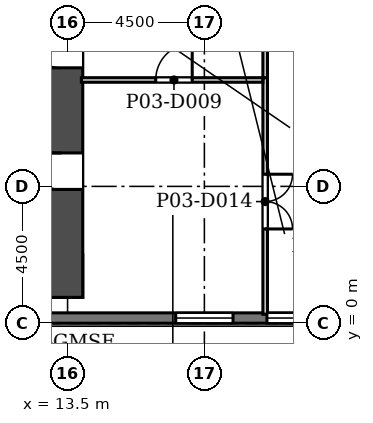
"""IFC4 building model, lengths in metres.
Left out: names, types, materials, properties, quantities, classifications, styles, units other than length and angle.
Written with IfcOpenShell. Run it as: python <this file> out.ifc"""

import sys

from ifc_helpers import new_model, si_unit, direction, frame, frame_2d, origin, place, context, subcontext, project, spatial, rectangle, extrude, element, fill, save


model = new_model("IFC4")
c1 = context("Model", 3, precision=1e-05, world=origin(), true_north=direction((0.0, 1.0)))
c2 = subcontext(c1, "Body", "Model", "MODEL_VIEW")
j1 = project(units=[si_unit("LENGTHUNIT", "METRE"), si_unit("PLANEANGLEUNIT", "RADIAN")], contexts=[c1])
p1 = place(None, origin())
s1 = spatial("IfcSite", under=j1, at=p1, CompositionType="ELEMENT")
p2 = place(p1, origin())
s2 = spatial("IfcBuilding", under=s1, at=p2, CompositionType="ELEMENT")
p3 = place(p2, frame((0.0, 0.0, 20.0)))
s3 = spatial("IfcBuildingStorey", under=s2, at=p3, CompositionType="ELEMENT", Elevation=20.0)
p4 = place(p3, frame((-14.0, 1.55, 0.0), z_axis=(0.0, 0.0, 1.0), x_axis=(1.0, 0.0, 0.0)))
e1 = element("IfcWall", 1, at=p4, inside=s3, PredefinedType="SHEAR", context=c2, shape_type="SweptSolid", body=[
    extrude(rectangle(XDim=28.0, YDim=1.4, at=frame_2d((14.0, 0.0))), origin(), (0.0, 0.0, 1.0), 5.0),
])
p5 = place(p3, frame((13.3, 0.85, 0.0), z_axis=(0.0, 0.0, 1.0), x_axis=(0.0, 1.0, 0.0)))
e2 = element("IfcWall", 2, at=p5, inside=s3, PredefinedType="SHEAR", context=c2, shape_type="SweptSolid", body=[
    extrude(rectangle(XDim=10.202, YDim=1.4, at=frame_2d((5.101, 0.0))), origin(), (0.0, 0.0, 1.0), 5.0),
])
p6 = place(p5, frame((3.55, 0.0, 0.0)))
e3 = element("IfcOpeningElement", 3, at=p6, cuts=e2, PredefinedType="OPENING", context=c2, shape_type="SweptSolid", body=[
    extrude(rectangle(XDim=1.2, YDim=2.1, at=frame_2d((0.6, 1.05))), frame((0.0, 0.71, 0.0), z_axis=(0.0, -1.0, 0.0), x_axis=(1.0, 0.0, 0.0)), (0.0, 0.0, 1.0), 1.42),
])
p7 = place(p5, frame((7.55, 0.0, 0.0)))
e4 = element("IfcOpeningElement", 4, at=p7, cuts=e2, PredefinedType="OPENING", context=c2, shape_type="SweptSolid", body=[
    extrude(rectangle(XDim=1.2, YDim=2.1, at=frame_2d((0.6, 1.05))), frame((0.0, 0.71, 0.0), z_axis=(0.0, -1.0, 0.0), x_axis=(1.0, 0.0, 0.0)), (0.0, 0.0, 1.0), 1.42),
])
p8 = place(p3, frame((-38.0, 0.17, 0.0), z_axis=(0.0, 0.0, 1.0), x_axis=(1.0, 0.0, 0.0)))
e5 = element("IfcWall", 5, at=p8, inside=s3, PredefinedType="SOLIDWALL", context=c2, shape_type="SweptSolid", body=[
    extrude(rectangle(XDim=76.0, YDim=0.34, at=frame_2d((38.0, 0.0))), origin(), (0.0, 0.0, 1.0), 3.0),
])
p9 = place(p8, frame((1.058, 0.0, 0.9)))
e6 = element("IfcOpeningElement", 6, at=p9, cuts=e5, PredefinedType="OPENING", context=c2, shape_type="SweptSolid", body=[
    extrude(rectangle(XDim=1.885, YDim=1.9, at=frame_2d((0.942, 0.95))), frame((0.0, 0.18, 0.0), z_axis=(0.0, -1.0, 0.0), x_axis=(1.0, 0.0, 0.0)), (0.0, 0.0, 1.0), 0.36),
])
p10 = place(p8, frame((4.058, 0.0, 0.9)))
e7 = element("IfcOpeningElement", 7, at=p10, cuts=e5, PredefinedType="OPENING", context=c2, shape_type="SweptSolid", body=[
    extrude(rectangle(XDim=1.885, YDim=1.9, at=frame_2d((0.942, 0.95))), frame((0.0, 0.18, 0.0), z_axis=(0.0, -1.0, 0.0), x_axis=(1.0, 0.0, 0.0)), (0.0, 0.0, 1.0), 0.36),
])
p11 = place(p8, frame((7.058, 0.0, 0.9)))
e8 = element("IfcOpeningElement", 8, at=p11, cuts=e5, PredefinedType="OPENING", context=c2, shape_type="SweptSolid", body=[
    extrude(rectangle(XDim=1.885, YDim=1.9, at=frame_2d((0.942, 0.95))), frame((0.0, 0.18, 0.0), z_axis=(0.0, -1.0, 0.0), x_axis=(1.0, 0.0, 0.0)), (0.0, 0.0, 1.0), 0.36),
])
p12 = place(p8, frame((10.058, 0.0, 0.9)))
e9 = element("IfcOpeningElement", 9, at=p12, cuts=e5, PredefinedType="OPENING", context=c2, shape_type="SweptSolid", body=[
    extrude(rectangle(XDim=1.885, YDim=1.9, at=frame_2d((0.942, 0.95))), frame((0.0, 0.18, 0.0), z_axis=(0.0, -1.0, 0.0), x_axis=(1.0, 0.0, 0.0)), (0.0, 0.0, 1.0), 0.36),
])
p13 = place(p8, frame((13.058, 0.0, 0.9)))
e10 = element("IfcOpeningElement", 10, at=p13, cuts=e5, PredefinedType="OPENING", context=c2, shape_type="SweptSolid", body=[
    extrude(rectangle(XDim=1.885, YDim=1.9, at=frame_2d((0.942, 0.95))), frame((0.0, 0.18, 0.0), z_axis=(0.0, -1.0, 0.0), x_axis=(1.0, 0.0, 0.0)), (0.0, 0.0, 1.0), 0.36),
])
p14 = place(p8, frame((16.058, 0.0, 0.9)))
e11 = element("IfcOpeningElement", 11, at=p14, cuts=e5, PredefinedType="OPENING", context=c2, shape_type="SweptSolid", body=[
    extrude(rectangle(XDim=1.885, YDim=1.9, at=frame_2d((0.942, 0.95))), frame((0.0, 0.18, 0.0), z_axis=(0.0, -1.0, 0.0), x_axis=(1.0, 0.0, 0.0)), (0.0, 0.0, 1.0), 0.36),
])
p15 = place(p8, frame((19.058, 0.0, 0.9)))
e12 = element("IfcOpeningElement", 12, at=p15, cuts=e5, PredefinedType="OPENING", context=c2, shape_type="SweptSolid", body=[
    extrude(rectangle(XDim=1.885, YDim=1.9, at=frame_2d((0.942, 0.95))), frame((0.0, 0.18, 0.0), z_axis=(0.0, -1.0, 0.0), x_axis=(1.0, 0.0, 0.0)), (0.0, 0.0, 1.0), 0.36),
])
p16 = place(p8, frame((55.058, 0.0, 0.9)))
e13 = element("IfcOpeningElement", 13, at=p16, cuts=e5, PredefinedType="OPENING", context=c2, shape_type="SweptSolid", body=[
    extrude(rectangle(XDim=1.885, YDim=1.9, at=frame_2d((0.942, 0.95))), frame((0.0, 0.18, 0.0), z_axis=(0.0, -1.0, 0.0), x_axis=(1.0, 0.0, 0.0)), (0.0, 0.0, 1.0), 0.36),
])
p17 = place(p8, frame((58.058, 0.0, 0.9)))
e14 = element("IfcOpeningElement", 14, at=p17, cuts=e5, PredefinedType="OPENING", context=c2, shape_type="SweptSolid", body=[
    extrude(rectangle(XDim=1.885, YDim=1.9, at=frame_2d((0.942, 0.95))), frame((0.0, 0.18, 0.0), z_axis=(0.0, -1.0, 0.0), x_axis=(1.0, 0.0, 0.0)), (0.0, 0.0, 1.0), 0.36),
])
p18 = place(p8, frame((61.058, 0.0, 0.9)))
e15 = element("IfcOpeningElement", 15, at=p18, cuts=e5, PredefinedType="OPENING", context=c2, shape_type="SweptSolid", body=[
    extrude(rectangle(XDim=1.885, YDim=1.9, at=frame_2d((0.942, 0.95))), frame((0.0, 0.18, 0.0), z_axis=(0.0, -1.0, 0.0), x_axis=(1.0, 0.0, 0.0)), (0.0, 0.0, 1.0), 0.36),
])
p19 = place(p8, frame((64.058, 0.0, 0.9)))
e16 = element("IfcOpeningElement", 16, at=p19, cuts=e5, PredefinedType="OPENING", context=c2, shape_type="SweptSolid", body=[
    extrude(rectangle(XDim=1.885, YDim=1.9, at=frame_2d((0.942, 0.95))), frame((0.0, 0.18, 0.0), z_axis=(0.0, -1.0, 0.0), x_axis=(1.0, 0.0, 0.0)), (0.0, 0.0, 1.0), 0.36),
])
p20 = place(p8, frame((67.058, 0.0, 0.9)))
e17 = element("IfcOpeningElement", 17, at=p20, cuts=e5, PredefinedType="OPENING", context=c2, shape_type="SweptSolid", body=[
    extrude(rectangle(XDim=1.885, YDim=1.9, at=frame_2d((0.942, 0.95))), frame((0.0, 0.18, 0.0), z_axis=(0.0, -1.0, 0.0), x_axis=(1.0, 0.0, 0.0)), (0.0, 0.0, 1.0), 0.36),
])
p21 = place(p8, frame((70.058, 0.0, 0.9)))
e18 = element("IfcOpeningElement", 18, at=p21, cuts=e5, PredefinedType="OPENING", context=c2, shape_type="SweptSolid", body=[
    extrude(rectangle(XDim=1.885, YDim=1.9, at=frame_2d((0.942, 0.95))), frame((0.0, 0.18, 0.0), z_axis=(0.0, -1.0, 0.0), x_axis=(1.0, 0.0, 0.0)), (0.0, 0.0, 1.0), 0.36),
])
p22 = place(p8, frame((73.058, 0.0, 0.9)))
e19 = element("IfcOpeningElement", 19, at=p22, cuts=e5, PredefinedType="OPENING", context=c2, shape_type="SweptSolid", body=[
    extrude(rectangle(XDim=1.885, YDim=1.9, at=frame_2d((0.942, 0.95))), frame((0.0, 0.18, 0.0), z_axis=(0.0, -1.0, 0.0), x_axis=(1.0, 0.0, 0.0)), (0.0, 0.0, 1.0), 0.36),
])
p23 = place(p3, frame((42.853, 8.575, 0.0), z_axis=(0.0, 0.0, 1.0), x_axis=(-0.49999894854, 0.866026010844, 0.0)))
e20 = element("IfcWall", 20, at=p23, inside=s3, PredefinedType="SOLIDWALL", context=c2, shape_type="SweptSolid", body=[
    extrude(rectangle(XDim=76.0, YDim=0.34, at=frame_2d((38.0, 0.0))), origin(), (0.0, 0.0, 1.0), 3.0),
])
p24 = place(p23, frame((1.058, 0.0, 0.9)))
e21 = element("IfcOpeningElement", 21, at=p24, cuts=e20, PredefinedType="OPENING", context=c2, shape_type="SweptSolid", body=[
    extrude(rectangle(XDim=1.885, YDim=1.9, at=frame_2d((0.942, 0.95))), frame((0.0, 0.18, 0.0), z_axis=(0.0, -1.0, 0.0), x_axis=(1.0, 0.0, 0.0)), (0.0, 0.0, 1.0), 0.36),
])
p25 = place(p23, frame((4.058, 0.0, 0.9)))
e22 = element("IfcOpeningElement", 22, at=p25, cuts=e20, PredefinedType="OPENING", context=c2, shape_type="SweptSolid", body=[
    extrude(rectangle(XDim=1.885, YDim=1.9, at=frame_2d((0.942, 0.95))), frame((0.0, 0.18, 0.0), z_axis=(0.0, -1.0, 0.0), x_axis=(1.0, 0.0, 0.0)), (0.0, 0.0, 1.0), 0.36),
])
p26 = place(p23, frame((7.058, 0.0, 0.9)))
e23 = element("IfcOpeningElement", 23, at=p26, cuts=e20, PredefinedType="OPENING", context=c2, shape_type="SweptSolid", body=[
    extrude(rectangle(XDim=1.885, YDim=1.9, at=frame_2d((0.942, 0.95))), frame((0.0, 0.18, 0.0), z_axis=(0.0, -1.0, 0.0), x_axis=(1.0, 0.0, 0.0)), (0.0, 0.0, 1.0), 0.36),
])
p27 = place(p23, frame((10.058, 0.0, 0.9)))
e24 = element("IfcOpeningElement", 24, at=p27, cuts=e20, PredefinedType="OPENING", context=c2, shape_type="SweptSolid", body=[
    extrude(rectangle(XDim=1.885, YDim=1.9, at=frame_2d((0.942, 0.95))), frame((0.0, 0.18, 0.0), z_axis=(0.0, -1.0, 0.0), x_axis=(1.0, 0.0, 0.0)), (0.0, 0.0, 1.0), 0.36),
])
p28 = place(p23, frame((13.058, 0.0, 0.9)))
e25 = element("IfcOpeningElement", 25, at=p28, cuts=e20, PredefinedType="OPENING", context=c2, shape_type="SweptSolid", body=[
    extrude(rectangle(XDim=1.885, YDim=1.9, at=frame_2d((0.942, 0.95))), frame((0.0, 0.18, 0.0), z_axis=(0.0, -1.0, 0.0), x_axis=(1.0, 0.0, 0.0)), (0.0, 0.0, 1.0), 0.36),
])
p29 = place(p23, frame((16.058, 0.0, 0.9)))
e26 = element("IfcOpeningElement", 26, at=p29, cuts=e20, PredefinedType="OPENING", context=c2, shape_type="SweptSolid", body=[
    extrude(rectangle(XDim=1.885, YDim=1.9, at=frame_2d((0.942, 0.95))), frame((0.0, 0.18, 0.0), z_axis=(0.0, -1.0, 0.0), x_axis=(1.0, 0.0, 0.0)), (0.0, 0.0, 1.0), 0.36),
])
p30 = place(p23, frame((19.058, 0.0, 0.9)))
e27 = element("IfcOpeningElement", 27, at=p30, cuts=e20, PredefinedType="OPENING", context=c2, shape_type="SweptSolid", body=[
    extrude(rectangle(XDim=1.885, YDim=1.9, at=frame_2d((0.942, 0.95))), frame((0.0, 0.18, 0.0), z_axis=(0.0, -1.0, 0.0), x_axis=(1.0, 0.0, 0.0)), (0.0, 0.0, 1.0), 0.36),
])
p31 = place(p23, frame((22.058, 0.0, 0.9)))
e28 = element("IfcOpeningElement", 28, at=p31, cuts=e20, PredefinedType="OPENING", context=c2, shape_type="SweptSolid", body=[
    extrude(rectangle(XDim=1.885, YDim=1.9, at=frame_2d((0.942, 0.95))), frame((0.0, 0.18, 0.0), z_axis=(0.0, -1.0, 0.0), x_axis=(1.0, 0.0, 0.0)), (0.0, 0.0, 1.0), 0.36),
])
p32 = place(p23, frame((25.058, 0.0, 0.9)))
e29 = element("IfcOpeningElement", 29, at=p32, cuts=e20, PredefinedType="OPENING", context=c2, shape_type="SweptSolid", body=[
    extrude(rectangle(XDim=1.885, YDim=1.9, at=frame_2d((0.942, 0.95))), frame((0.0, 0.18, 0.0), z_axis=(0.0, -1.0, 0.0), x_axis=(1.0, 0.0, 0.0)), (0.0, 0.0, 1.0), 0.36),
])
p33 = place(p23, frame((28.058, 0.0, 0.9)))
e30 = element("IfcOpeningElement", 30, at=p33, cuts=e20, PredefinedType="OPENING", context=c2, shape_type="SweptSolid", body=[
    extrude(rectangle(XDim=1.885, YDim=1.9, at=frame_2d((0.942, 0.95))), frame((0.0, 0.18, 0.0), z_axis=(0.0, -1.0, 0.0), x_axis=(1.0, 0.0, 0.0)), (0.0, 0.0, 1.0), 0.36),
])
p34 = place(p23, frame((31.058, 0.0, 0.9)))
e31 = element("IfcOpeningElement", 31, at=p34, cuts=e20, PredefinedType="OPENING", context=c2, shape_type="SweptSolid", body=[
    extrude(rectangle(XDim=1.885, YDim=1.9, at=frame_2d((0.942, 0.95))), frame((0.0, 0.18, 0.0), z_axis=(0.0, -1.0, 0.0), x_axis=(1.0, 0.0, 0.0)), (0.0, 0.0, 1.0), 0.36),
])
p35 = place(p23, frame((34.058, 0.0, 0.9)))
e32 = element("IfcOpeningElement", 32, at=p35, cuts=e20, PredefinedType="OPENING", context=c2, shape_type="SweptSolid", body=[
    extrude(rectangle(XDim=1.885, YDim=1.9, at=frame_2d((0.942, 0.95))), frame((0.0, 0.18, 0.0), z_axis=(0.0, -1.0, 0.0), x_axis=(1.0, 0.0, 0.0)), (0.0, 0.0, 1.0), 0.36),
])
p36 = place(p23, frame((37.058, 0.0, 0.9)))
e33 = element("IfcOpeningElement", 33, at=p36, cuts=e20, PredefinedType="OPENING", context=c2, shape_type="SweptSolid", body=[
    extrude(rectangle(XDim=1.885, YDim=1.9, at=frame_2d((0.942, 0.95))), frame((0.0, 0.18, 0.0), z_axis=(0.0, -1.0, 0.0), x_axis=(1.0, 0.0, 0.0)), (0.0, 0.0, 1.0), 0.36),
])
p37 = place(p23, frame((40.058, 0.0, 0.9)))
e34 = element("IfcOpeningElement", 34, at=p37, cuts=e20, PredefinedType="OPENING", context=c2, shape_type="SweptSolid", body=[
    extrude(rectangle(XDim=1.885, YDim=1.9, at=frame_2d((0.942, 0.95))), frame((0.0, 0.18, 0.0), z_axis=(0.0, -1.0, 0.0), x_axis=(1.0, 0.0, 0.0)), (0.0, 0.0, 1.0), 0.36),
])
p38 = place(p23, frame((43.058, 0.0, 0.9)))
e35 = element("IfcOpeningElement", 35, at=p38, cuts=e20, PredefinedType="OPENING", context=c2, shape_type="SweptSolid", body=[
    extrude(rectangle(XDim=1.885, YDim=1.9, at=frame_2d((0.942, 0.95))), frame((0.0, 0.18, 0.0), z_axis=(0.0, -1.0, 0.0), x_axis=(1.0, 0.0, 0.0)), (0.0, 0.0, 1.0), 0.36),
])
p39 = place(p23, frame((46.058, 0.0, 0.9)))
e36 = element("IfcOpeningElement", 36, at=p39, cuts=e20, PredefinedType="OPENING", context=c2, shape_type="SweptSolid", body=[
    extrude(rectangle(XDim=1.885, YDim=1.9, at=frame_2d((0.942, 0.95))), frame((0.0, 0.18, 0.0), z_axis=(0.0, -1.0, 0.0), x_axis=(1.0, 0.0, 0.0)), (0.0, 0.0, 1.0), 0.36),
])
p40 = place(p23, frame((49.058, 0.0, 0.9)))
e37 = element("IfcOpeningElement", 37, at=p40, cuts=e20, PredefinedType="OPENING", context=c2, shape_type="SweptSolid", body=[
    extrude(rectangle(XDim=1.885, YDim=1.9, at=frame_2d((0.942, 0.95))), frame((0.0, 0.18, 0.0), z_axis=(0.0, -1.0, 0.0), x_axis=(1.0, 0.0, 0.0)), (0.0, 0.0, 1.0), 0.36),
])
p41 = place(p23, frame((52.058, 0.0, 0.9)))
e38 = element("IfcOpeningElement", 38, at=p41, cuts=e20, PredefinedType="OPENING", context=c2, shape_type="SweptSolid", body=[
    extrude(rectangle(XDim=1.885, YDim=1.9, at=frame_2d((0.942, 0.95))), frame((0.0, 0.18, 0.0), z_axis=(0.0, -1.0, 0.0), x_axis=(1.0, 0.0, 0.0)), (0.0, 0.0, 1.0), 0.36),
])
p42 = place(p23, frame((55.058, 0.0, 0.9)))
e39 = element("IfcOpeningElement", 39, at=p42, cuts=e20, PredefinedType="OPENING", context=c2, shape_type="SweptSolid", body=[
    extrude(rectangle(XDim=1.885, YDim=1.9, at=frame_2d((0.942, 0.95))), frame((0.0, 0.18, 0.0), z_axis=(0.0, -1.0, 0.0), x_axis=(1.0, 0.0, 0.0)), (0.0, 0.0, 1.0), 0.36),
])
p43 = place(p23, frame((58.058, 0.0, 0.9)))
e40 = element("IfcOpeningElement", 40, at=p43, cuts=e20, PredefinedType="OPENING", context=c2, shape_type="SweptSolid", body=[
    extrude(rectangle(XDim=1.885, YDim=1.9, at=frame_2d((0.942, 0.95))), frame((0.0, 0.18, 0.0), z_axis=(0.0, -1.0, 0.0), x_axis=(1.0, 0.0, 0.0)), (0.0, 0.0, 1.0), 0.36),
])
p44 = place(p23, frame((61.058, 0.0, 0.9)))
e41 = element("IfcOpeningElement", 41, at=p44, cuts=e20, PredefinedType="OPENING", context=c2, shape_type="SweptSolid", body=[
    extrude(rectangle(XDim=1.885, YDim=1.9, at=frame_2d((0.942, 0.95))), frame((0.0, 0.18, 0.0), z_axis=(0.0, -1.0, 0.0), x_axis=(1.0, 0.0, 0.0)), (0.0, 0.0, 1.0), 0.36),
])
p45 = place(p23, frame((64.058, 0.0, 0.9)))
e42 = element("IfcOpeningElement", 42, at=p45, cuts=e20, PredefinedType="OPENING", context=c2, shape_type="SweptSolid", body=[
    extrude(rectangle(XDim=1.885, YDim=1.9, at=frame_2d((0.942, 0.95))), frame((0.0, 0.18, 0.0), z_axis=(0.0, -1.0, 0.0), x_axis=(1.0, 0.0, 0.0)), (0.0, 0.0, 1.0), 0.36),
])
p46 = place(p23, frame((67.058, 0.0, 0.9)))
e43 = element("IfcOpeningElement", 43, at=p46, cuts=e20, PredefinedType="OPENING", context=c2, shape_type="SweptSolid", body=[
    extrude(rectangle(XDim=1.885, YDim=1.9, at=frame_2d((0.942, 0.95))), frame((0.0, 0.18, 0.0), z_axis=(0.0, -1.0, 0.0), x_axis=(1.0, 0.0, 0.0)), (0.0, 0.0, 1.0), 0.36),
])
p47 = place(p23, frame((70.058, 0.0, 0.9)))
e44 = element("IfcOpeningElement", 44, at=p47, cuts=e20, PredefinedType="OPENING", context=c2, shape_type="SweptSolid", body=[
    extrude(rectangle(XDim=1.885, YDim=1.9, at=frame_2d((0.942, 0.95))), frame((0.0, 0.18, 0.0), z_axis=(0.0, -1.0, 0.0), x_axis=(1.0, 0.0, 0.0)), (0.0, 0.0, 1.0), 0.36),
])
p48 = place(p23, frame((73.058, 0.0, 0.9)))
e45 = element("IfcOpeningElement", 45, at=p48, cuts=e20, PredefinedType="OPENING", context=c2, shape_type="SweptSolid", body=[
    extrude(rectangle(XDim=1.885, YDim=1.9, at=frame_2d((0.942, 0.95))), frame((0.0, 0.18, 0.0), z_axis=(0.0, -1.0, 0.0), x_axis=(1.0, 0.0, 0.0)), (0.0, 0.0, 1.0), 0.36),
])
p49 = place(p3, frame((20.0, 0.295, 0.0), z_axis=(0.0, 0.0, 1.0), x_axis=(0.0, 1.0, 0.0)))
e46 = element("IfcWall", 46, at=p49, inside=s3, PredefinedType="PARTITIONING", context=c2, shape_type="SweptSolid", body=[
    extrude(rectangle(XDim=7.78, YDim=0.15, at=frame_2d((3.89, 0.0))), origin(), (0.0, 0.0, 1.0), 3.0),
])
p50 = place(p49, frame((2.805, 0.0, 0.0)))
e47 = element("IfcOpeningElement", 47, at=p50, cuts=e46, PredefinedType="OPENING", context=c2, shape_type="SweptSolid", body=[
    extrude(rectangle(XDim=1.8, YDim=2.1, at=frame_2d((0.9, 1.05))), frame((0.0, 0.085, 0.0), z_axis=(0.0, -1.0, 0.0), x_axis=(1.0, 0.0, 0.0)), (0.0, 0.0, 1.0), 0.17),
])
p51 = place(p3, frame((13.955, 8.0, 0.0), z_axis=(0.0, 0.0, 1.0), x_axis=(1.0, 0.0, 0.0)))
e48 = element("IfcWall", 48, at=p51, inside=s3, PredefinedType="PARTITIONING", context=c2, shape_type="SweptSolid", body=[
    extrude(rectangle(XDim=5.97, YDim=0.15, at=frame_2d((2.985, 0.0))), origin(), (0.0, 0.0, 1.0), 3.0),
])
p52 = place(p51, frame((2.445, 0.0, 0.0)))
e49 = element("IfcOpeningElement", 49, at=p52, cuts=e48, PredefinedType="OPENING", context=c2, shape_type="SweptSolid", body=[
    extrude(rectangle(XDim=1.2, YDim=2.1, at=frame_2d((0.6, 1.05))), frame((0.0, 0.085, 0.0), z_axis=(0.0, -1.0, 0.0), x_axis=(1.0, 0.0, 0.0)), (0.0, 0.0, 1.0), 0.17),
])
p53 = place(p3, frame((20.0, 8.075, 0.0), z_axis=(0.0, 0.0, 1.0), x_axis=(0.0, 1.0, 0.0)))
e50 = element("IfcWall", 50, at=p53, inside=s3, PredefinedType="PARTITIONING", context=c2, shape_type="SweptSolid", body=[
    extrude(rectangle(XDim=1.85, YDim=0.15, at=frame_2d((0.925, 0.0))), origin(), (0.0, 0.0, 1.0), 3.0),
])
p54 = place(p16, origin())
e51 = element("IfcWindow", 51, at=p54, inside=s3, PartitioningType="SINGLE_PANEL", PredefinedType="WINDOW", context=c2, shape_type="SweptSolid", body=[
    extrude(rectangle(XDim=1.885, YDim=1.9, at=frame_2d((0.942, 0.95))), frame((0.0, 0.11, 0.0), z_axis=(0.0, -1.0, 0.0), x_axis=(1.0, 0.0, 0.0)), (0.0, 0.0, 1.0), 0.06),
])
fill(e13, e51)
p55 = place(p17, origin())
e52 = element("IfcWindow", 52, at=p55, inside=s3, PartitioningType="SINGLE_PANEL", PredefinedType="WINDOW", context=c2, shape_type="SweptSolid", body=[
    extrude(rectangle(XDim=1.885, YDim=1.9, at=frame_2d((0.942, 0.95))), frame((0.0, 0.11, 0.0), z_axis=(0.0, -1.0, 0.0), x_axis=(1.0, 0.0, 0.0)), (0.0, 0.0, 1.0), 0.06),
])
fill(e14, e52)
p56 = place(p6, origin())
e53 = element("IfcDoor", 53, at=p56, inside=s3, OperationType="SINGLE_SWING_RIGHT", PredefinedType="DOOR", context=c2, shape_type="SweptSolid", body=[
    extrude(rectangle(XDim=1.2, YDim=2.1, at=frame_2d((0.6, 1.05))), frame((0.0, 0.025, 0.0), z_axis=(0.0, -1.0, 0.0), x_axis=(1.0, 0.0, 0.0)), (0.0, 0.0, 1.0), 0.05),
])
fill(e3, e53)
p57 = place(p7, origin())
e54 = element("IfcDoor", 54, at=p57, inside=s3, OperationType="SINGLE_SWING_RIGHT", PredefinedType="DOOR", context=c2, shape_type="SweptSolid", body=[
    extrude(rectangle(XDim=1.2, YDim=2.1, at=frame_2d((0.6, 1.05))), frame((0.0, 0.025, 0.0), z_axis=(0.0, -1.0, 0.0), x_axis=(1.0, 0.0, 0.0)), (0.0, 0.0, 1.0), 0.05),
])
fill(e4, e54)
p58 = place(p52, origin())
e55 = element("IfcDoor", 55, at=p58, inside=s3, OperationType="SINGLE_SWING_RIGHT", PredefinedType="DOOR", context=c2, shape_type="SweptSolid", body=[
    extrude(rectangle(XDim=1.2, YDim=2.1, at=frame_2d((0.6, 1.05))), frame((0.0, 0.025, 0.0), z_axis=(0.0, -1.0, 0.0), x_axis=(1.0, 0.0, 0.0)), (0.0, 0.0, 1.0), 0.05),
])
fill(e49, e55)
p59 = place(p50, frame((1.8, 0.0, 0.0), z_axis=(0.0, 0.0, 1.0), x_axis=(-1.0, 0.0, 0.0)))
e56 = element("IfcDoor", 56, at=p59, inside=s3, OperationType="DOUBLE_DOOR_SINGLE_SWING", PredefinedType="DOOR", context=c2, shape_type="SweptSolid", body=[
    extrude(rectangle(XDim=1.8, YDim=2.1, at=frame_2d((0.9, 1.05))), frame((0.0, 0.025, 0.0), z_axis=(0.0, -1.0, 0.0), x_axis=(1.0, 0.0, 0.0)), (0.0, 0.0, 1.0), 0.05),
])
fill(e47, e56)
save(model, sys.argv[1])
